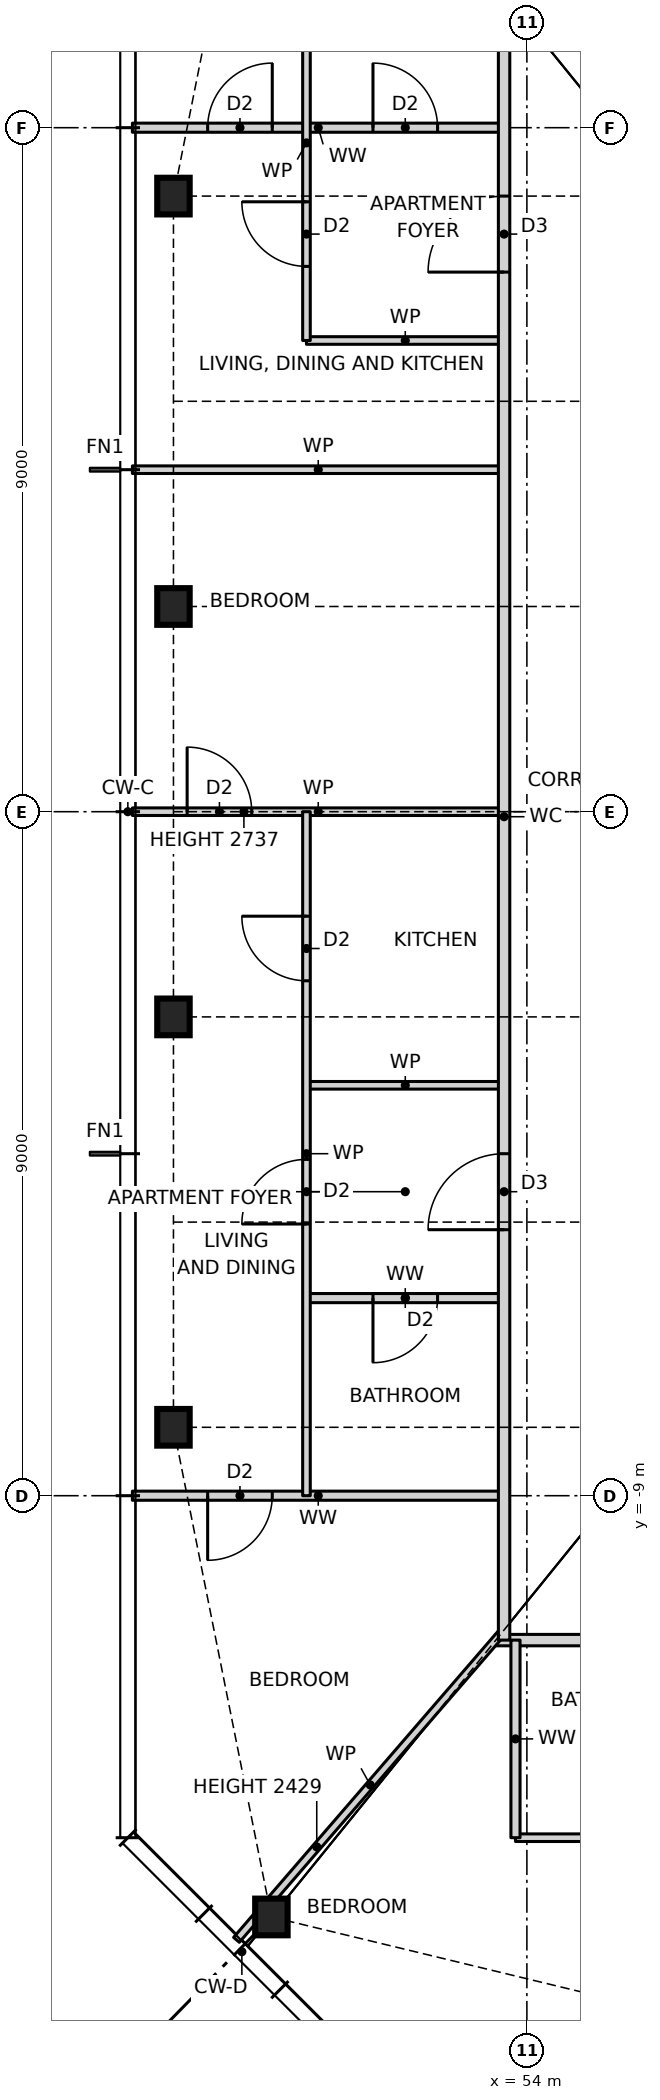
"""IFC4 building model, lengths in metres.
Left out: names, types, materials, properties, quantities, classifications, styles, units other than length and angle.
Written with IfcOpenShell. Run it as: python <this file> out.ifc"""

import sys

from ifc_helpers import new_model, si_unit, direction, frame, frame_2d, origin, origin_2d, place, context, subcontext, project, spatial, rectangle, i_section, extrude, element, fill, save


model = new_model("IFC4")
c1 = context("Model", 3, precision=1e-05, world=origin(), true_north=direction((0.0, 1.0)))
c2 = subcontext(c1, "Body", "Model", "MODEL_VIEW")
j1 = project(units=[si_unit("LENGTHUNIT", "METRE"), si_unit("PLANEANGLEUNIT", "RADIAN")], contexts=[c1])
p1 = place(None, origin())
s1 = spatial("IfcSite", under=j1, at=p1, CompositionType="ELEMENT")
p2 = place(p1, origin())
s2 = spatial("IfcBuilding", under=s1, at=p2, CompositionType="ELEMENT")
p3 = place(p2, frame((0.0, 0.0, 87.5)))
s3 = spatial("IfcBuildingStorey", under=s2, at=p3, CompositionType="ELEMENT", Elevation=87.5)
for number, where, z_axis, x_axis in (
    (1, (50.639, -14.543, 0.0), (0.0, 0.0, 1.0), (1.0, 0.0, 0.0)),
    (2, (49.35, 8.1, 0.0), (0.0, 0.0, 1.0), (1.0, 0.0, 0.0)),
    (3, (49.35, 2.7, 0.0), (0.0, 0.0, 1.0), (1.0, 0.0, 0.0)),
    (4, (49.35, -2.7, 0.0), (0.0, 0.0, 1.0), (1.0, 0.0, 0.0)),
    (5, (49.35, -8.1, 0.0), (0.0, 0.0, 1.0), (1.0, 0.0, 0.0)),
):
    element("IfcColumn", number, at=place(p3, frame(where, z_axis=z_axis, x_axis=x_axis)), inside=s3, PredefinedType="COLUMN", context=c2, shape_type="SweptSolid", body=[
        extrude(i_section(OverallWidth=0.427, OverallDepth=0.483, WebThickness=0.051, FlangeThickness=0.082, at=origin_2d()), origin(), (0.0, 0.0, 1.0), 3.5),
    ])
p4 = place(p3, frame((53.85, -13.5, 0.0), z_axis=(0.0, 0.0, 1.0), x_axis=(1.0, 0.0, 0.0)))
e6 = element("IfcWall", 6, at=p4, inside=s3, PredefinedType="PARTITIONING", context=c2, shape_type="SweptSolid", body=[
    extrude(rectangle(XDim=5.2, YDim=0.1, at=frame_2d((2.6, 0.0))), origin(), (0.0, 0.0, 1.0), 3.27),
])
p5 = place(p4, frame((3.375, 0.0, 0.0)))
e7 = element("IfcOpeningElement", 7, at=p5, cuts=e6, PredefinedType="OPENING", context=c2, shape_type="SweptSolid", body=[
    extrude(rectangle(XDim=0.85, YDim=2.1, at=frame_2d((0.425, 1.05))), frame((0.0, 0.06, 0.0), z_axis=(0.0, -1.0, 0.0), x_axis=(1.0, 0.0, 0.0)), (0.0, 0.0, 1.0), 0.12),
])
p6 = place(p3, frame((53.586, -10.9, 0.0), z_axis=(0.0, 0.0, 1.0), x_axis=(1.0, 0.0, 0.0)))
e8 = element("IfcWall", 8, at=p6, inside=s3, PredefinedType="PARTITIONING", context=c2, shape_type="SweptSolid", body=[
    extrude(rectangle(XDim=18.828, YDim=0.15, at=frame_2d((9.414, 0.0))), origin(), (0.0, 0.0, 1.0), 3.27),
])
p7 = place(p6, frame((3.564, 0.0, 0.0)))
e9 = element("IfcOpeningElement", 9, at=p7, cuts=e8, PredefinedType="OPENING", context=c2, shape_type="SweptSolid", body=[
    extrude(rectangle(XDim=1.0, YDim=2.1, at=frame_2d((0.5, 1.05))), frame((0.0, 0.085, 0.0), z_axis=(0.0, -1.0, 0.0), x_axis=(1.0, 0.0, 0.0)), (0.0, 0.0, 1.0), 0.17),
])
p8 = place(p6, frame((7.789, 0.0, 0.0)))
e10 = element("IfcOpeningElement", 10, at=p8, cuts=e8, PredefinedType="OPENING", context=c2, shape_type="SweptSolid", body=[
    extrude(rectangle(XDim=1.0, YDim=2.1, at=frame_2d((0.5, 1.05))), frame((0.0, 0.085, 0.0), z_axis=(0.0, -1.0, 0.0), x_axis=(1.0, 0.0, 0.0)), (0.0, 0.0, 1.0), 0.17),
])
p9 = place(p6, frame((12.564, 0.0, 0.0)))
e11 = element("IfcOpeningElement", 11, at=p9, cuts=e8, PredefinedType="OPENING", context=c2, shape_type="SweptSolid", body=[
    extrude(rectangle(XDim=1.0, YDim=2.1, at=frame_2d((0.5, 1.05))), frame((0.0, 0.085, 0.0), z_axis=(0.0, -1.0, 0.0), x_axis=(1.0, 0.0, 0.0)), (0.0, 0.0, 1.0), 0.17),
])
p10 = place(p3, frame((48.81, -9.0, 0.0), z_axis=(0.0, 0.0, 1.0), x_axis=(1.0, 0.0, 0.0)))
e12 = element("IfcWall", 12, at=p10, inside=s3, PredefinedType="PARTITIONING", context=c2, shape_type="SweptSolid", body=[
    extrude(rectangle(XDim=4.89, YDim=0.12, at=frame_2d((2.445, 0.0))), origin(), (0.0, 0.0, 1.0), 3.27),
])
p11 = place(p10, frame((0.99, 0.0, 0.0)))
e13 = element("IfcOpeningElement", 13, at=p11, cuts=e12, PredefinedType="OPENING", context=c2, shape_type="SweptSolid", body=[
    extrude(rectangle(XDim=0.85, YDim=2.1, at=frame_2d((0.425, 1.05))), frame((0.0, 0.07, 0.0), z_axis=(0.0, -1.0, 0.0), x_axis=(1.0, 0.0, 0.0)), (0.0, 0.0, 1.0), 0.14),
])
p12 = place(p3, frame((51.1, -6.4, 0.0), z_axis=(0.0, 0.0, 1.0), x_axis=(1.0, 0.0, 0.0)))
e14 = element("IfcWall", 14, at=p12, inside=s3, PredefinedType="PARTITIONING", context=c2, shape_type="SweptSolid", body=[
    extrude(rectangle(XDim=2.6, YDim=0.12, at=frame_2d((1.3, 0.0))), origin(), (0.0, 0.0, 1.0), 3.27),
])
p13 = place(p12, frame((0.875, 0.0, 0.0)))
e15 = element("IfcOpeningElement", 15, at=p13, cuts=e14, PredefinedType="OPENING", context=c2, shape_type="SweptSolid", body=[
    extrude(rectangle(XDim=0.85, YDim=2.1, at=frame_2d((0.425, 1.05))), frame((0.0, 0.07, 0.0), z_axis=(0.0, -1.0, 0.0), x_axis=(1.0, 0.0, 0.0)), (0.0, 0.0, 1.0), 0.14),
])
p14 = place(p3, frame((51.1, -3.6, 0.0), z_axis=(0.0, 0.0, 1.0), x_axis=(1.0, 0.0, 0.0)))
e16 = element("IfcWall", 16, at=p14, inside=s3, PredefinedType="PARTITIONING", context=c2, shape_type="SweptSolid", body=[
    extrude(rectangle(XDim=2.6, YDim=0.1, at=frame_2d((1.3, 0.0))), origin(), (0.0, 0.0, 1.0), 3.27),
])
p15 = place(p3, frame((48.81, 0.0, 0.0), z_axis=(0.0, 0.0, 1.0), x_axis=(1.0, 0.0, 0.0)))
e17 = element("IfcWall", 17, at=p15, inside=s3, PredefinedType="PARTITIONING", context=c2, shape_type="SweptSolid", body=[
    extrude(rectangle(XDim=4.89, YDim=0.1, at=frame_2d((2.445, 0.0))), origin(), (0.0, 0.0, 1.0), 2.737),
])
p16 = place(p15, frame((0.72, 0.0, 0.0)))
e18 = element("IfcOpeningElement", 18, at=p16, cuts=e17, PredefinedType="OPENING", context=c2, shape_type="SweptSolid", body=[
    extrude(rectangle(XDim=0.85, YDim=2.1, at=frame_2d((0.425, 1.05))), frame((0.0, 0.06, 0.0), z_axis=(0.0, -1.0, 0.0), x_axis=(1.0, 0.0, 0.0)), (0.0, 0.0, 1.0), 0.12),
])
p17 = place(p3, frame((48.81, 4.5, 0.0), z_axis=(0.0, 0.0, 1.0), x_axis=(1.0, 0.0, 0.0)))
e19 = element("IfcWall", 19, at=p17, inside=s3, PredefinedType="PARTITIONING", context=c2, shape_type="SweptSolid", body=[
    extrude(rectangle(XDim=4.89, YDim=0.1, at=frame_2d((2.445, 0.0))), origin(), (0.0, 0.0, 1.0), 3.27),
])
p18 = place(p3, frame((51.1, 6.2, 0.0), z_axis=(0.0, 0.0, 1.0), x_axis=(1.0, 0.0, 0.0)))
e20 = element("IfcWall", 20, at=p18, inside=s3, PredefinedType="PARTITIONING", context=c2, shape_type="SweptSolid", body=[
    extrude(rectangle(XDim=2.6, YDim=0.1, at=frame_2d((1.3, 0.0))), origin(), (0.0, 0.0, 1.0), 3.27),
])
p19 = place(p3, frame((48.81, 9.0, 0.0), z_axis=(0.0, 0.0, 1.0), x_axis=(1.0, 0.0, 0.0)))
e21 = element("IfcWall", 21, at=p19, inside=s3, PredefinedType="PARTITIONING", context=c2, shape_type="SweptSolid", body=[
    extrude(rectangle(XDim=4.89, YDim=0.12, at=frame_2d((2.445, 0.0))), origin(), (0.0, 0.0, 1.0), 3.27),
])
p20 = place(p19, frame((3.165, 0.0, 0.0)))
e22 = element("IfcOpeningElement", 22, at=p20, cuts=e21, PredefinedType="OPENING", context=c2, shape_type="SweptSolid", body=[
    extrude(rectangle(XDim=0.85, YDim=2.1, at=frame_2d((0.425, 1.05))), frame((0.0, 0.07, 0.0), z_axis=(0.0, -1.0, 0.0), x_axis=(1.0, 0.0, 0.0)), (0.0, 0.0, 1.0), 0.14),
])
p21 = place(p19, frame((0.99, 0.0, 0.0)))
e23 = element("IfcOpeningElement", 23, at=p21, cuts=e21, PredefinedType="OPENING", context=c2, shape_type="SweptSolid", body=[
    extrude(rectangle(XDim=0.85, YDim=2.1, at=frame_2d((0.425, 1.05))), frame((0.0, 0.07, 0.0), z_axis=(0.0, -1.0, 0.0), x_axis=(1.0, 0.0, 0.0)), (0.0, 0.0, 1.0), 0.14),
])
p22 = place(p3, frame((50.179, -14.844, 0.0), z_axis=(0.0, 0.0, 1.0), x_axis=(0.653713095188, 0.756742485381, 0.0)))
e24 = element("IfcWall", 24, at=p22, inside=s3, PredefinedType="PARTITIONING", context=c2, shape_type="SweptSolid", body=[
    extrude(rectangle(XDim=5.386, YDim=0.1, at=frame_2d((2.693, 0.0))), origin(), (0.0, 0.0, 1.0), 2.429),
])
p23 = place(p3, frame((53.85, -13.5, 0.0), z_axis=(0.0, 0.0, 1.0), x_axis=(0.0, 1.0, 0.0)))
e25 = element("IfcWall", 25, at=p23, inside=s3, PredefinedType="PARTITIONING", context=c2, shape_type="SweptSolid", body=[
    extrude(rectangle(XDim=2.6, YDim=0.12, at=frame_2d((1.3, 0.0))), origin(), (0.0, 0.0, 1.0), 3.27),
])
p24 = place(p3, frame((53.7, -10.9, 0.0), z_axis=(0.0, 0.0, 1.0), x_axis=(0.0, 1.0, 0.0)))
e26 = element("IfcWall", 26, at=p24, inside=s3, PredefinedType="PARTITIONING", context=c2, shape_type="SweptSolid", body=[
    extrude(rectangle(XDim=21.668, YDim=0.15, at=frame_2d((10.834, 0.0))), origin(), (0.0, 0.0, 1.0), 3.27),
])
p25 = place(p24, frame((18.0, 0.0, 0.0)))
e27 = element("IfcOpeningElement", 27, at=p25, cuts=e26, PredefinedType="OPENING", context=c2, shape_type="SweptSolid", body=[
    extrude(rectangle(XDim=1.0, YDim=2.1, at=frame_2d((0.5, 1.05))), frame((0.0, 0.085, 0.0), z_axis=(0.0, -1.0, 0.0), x_axis=(1.0, 0.0, 0.0)), (0.0, 0.0, 1.0), 0.17),
])
p26 = place(p24, frame((5.4, 0.0, 0.0)))
e28 = element("IfcOpeningElement", 28, at=p26, cuts=e26, PredefinedType="OPENING", context=c2, shape_type="SweptSolid", body=[
    extrude(rectangle(XDim=1.0, YDim=2.1, at=frame_2d((0.5, 1.05))), frame((0.0, 0.085, 0.0), z_axis=(0.0, -1.0, 0.0), x_axis=(1.0, 0.0, 0.0)), (0.0, 0.0, 1.0), 0.17),
])
p27 = place(p3, frame((51.1, -9.0, 0.0), z_axis=(0.0, 0.0, 1.0), x_axis=(0.0, 1.0, 0.0)))
e29 = element("IfcWall", 29, at=p27, inside=s3, PredefinedType="PARTITIONING", context=c2, shape_type="SweptSolid", body=[
    extrude(rectangle(XDim=9.0, YDim=0.1, at=frame_2d((4.5, 0.0))), origin(), (0.0, 0.0, 1.0), 3.27),
])
p28 = place(p27, frame((6.775, 0.0, 0.0)))
e30 = element("IfcOpeningElement", 30, at=p28, cuts=e29, PredefinedType="OPENING", context=c2, shape_type="SweptSolid", body=[
    extrude(rectangle(XDim=0.85, YDim=2.1, at=frame_2d((0.425, 1.05))), frame((0.0, 0.06, 0.0), z_axis=(0.0, -1.0, 0.0), x_axis=(1.0, 0.0, 0.0)), (0.0, 0.0, 1.0), 0.12),
])
p29 = place(p27, frame((3.575, 0.0, 0.0)))
e31 = element("IfcOpeningElement", 31, at=p29, cuts=e29, PredefinedType="OPENING", context=c2, shape_type="SweptSolid", body=[
    extrude(rectangle(XDim=0.85, YDim=2.1, at=frame_2d((0.425, 1.05))), frame((0.0, 0.06, 0.0), z_axis=(0.0, -1.0, 0.0), x_axis=(1.0, 0.0, 0.0)), (0.0, 0.0, 1.0), 0.12),
])
p30 = place(p3, frame((51.1, 6.2, 0.0), z_axis=(0.0, 0.0, 1.0), x_axis=(0.0, 1.0, 0.0)))
e32 = element("IfcWall", 32, at=p30, inside=s3, PredefinedType="PARTITIONING", context=c2, shape_type="SweptSolid", body=[
    extrude(rectangle(XDim=5.2, YDim=0.1, at=frame_2d((2.6, 0.0))), origin(), (0.0, 0.0, 1.0), 3.27),
])
p31 = place(p30, frame((0.975, 0.0, 0.0)))
e33 = element("IfcOpeningElement", 33, at=p31, cuts=e32, PredefinedType="OPENING", context=c2, shape_type="SweptSolid", body=[
    extrude(rectangle(XDim=0.85, YDim=2.1, at=frame_2d((0.425, 1.05))), frame((0.0, 0.06, 0.0), z_axis=(0.0, -1.0, 0.0), x_axis=(1.0, 0.0, 0.0)), (0.0, 0.0, 1.0), 0.12),
])
p32 = place(p25, origin())
e34 = element("IfcDoor", 34, at=p32, inside=s3, OperationType="SINGLE_SWING_LEFT", PredefinedType="DOOR", context=c2, shape_type="SweptSolid", body=[
    extrude(rectangle(XDim=1.0, YDim=2.1, at=frame_2d((0.5, 1.05))), frame((0.0, 0.025, 0.0), z_axis=(0.0, -1.0, 0.0), x_axis=(1.0, 0.0, 0.0)), (0.0, 0.0, 1.0), 0.05),
])
fill(e27, e34)
p33 = place(p31, origin())
e35 = element("IfcDoor", 35, at=p33, inside=s3, OperationType="SINGLE_SWING_RIGHT", PredefinedType="DOOR", context=c2, shape_type="SweptSolid", body=[
    extrude(rectangle(XDim=0.85, YDim=2.1, at=frame_2d((0.425, 1.05))), frame((0.0, 0.025, 0.0), z_axis=(0.0, -1.0, 0.0), x_axis=(1.0, 0.0, 0.0)), (0.0, 0.0, 1.0), 0.05),
])
fill(e33, e35)
p34 = place(p20, origin())
e36 = element("IfcDoor", 36, at=p34, inside=s3, OperationType="SINGLE_SWING_LEFT", PredefinedType="DOOR", context=c2, shape_type="SweptSolid", body=[
    extrude(rectangle(XDim=0.85, YDim=2.1, at=frame_2d((0.425, 1.05))), frame((0.0, 0.025, 0.0), z_axis=(0.0, -1.0, 0.0), x_axis=(1.0, 0.0, 0.0)), (0.0, 0.0, 1.0), 0.05),
])
fill(e22, e36)
p35 = place(p21, origin())
e37 = element("IfcDoor", 37, at=p35, inside=s3, OperationType="SINGLE_SWING_RIGHT", PredefinedType="DOOR", context=c2, shape_type="SweptSolid", body=[
    extrude(rectangle(XDim=0.85, YDim=2.1, at=frame_2d((0.425, 1.05))), frame((0.0, 0.025, 0.0), z_axis=(0.0, -1.0, 0.0), x_axis=(1.0, 0.0, 0.0)), (0.0, 0.0, 1.0), 0.05),
])
fill(e23, e37)
p36 = place(p28, origin())
e38 = element("IfcDoor", 38, at=p36, inside=s3, OperationType="SINGLE_SWING_RIGHT", PredefinedType="DOOR", context=c2, shape_type="SweptSolid", body=[
    extrude(rectangle(XDim=0.85, YDim=2.1, at=frame_2d((0.425, 1.05))), frame((0.0, 0.025, 0.0), z_axis=(0.0, -1.0, 0.0), x_axis=(1.0, 0.0, 0.0)), (0.0, 0.0, 1.0), 0.05),
])
fill(e30, e38)
p37 = place(p26, origin())
e39 = element("IfcDoor", 39, at=p37, inside=s3, OperationType="SINGLE_SWING_LEFT", PredefinedType="DOOR", context=c2, shape_type="SweptSolid", body=[
    extrude(rectangle(XDim=1.0, YDim=2.1, at=frame_2d((0.5, 1.05))), frame((0.0, 0.025, 0.0), z_axis=(0.0, -1.0, 0.0), x_axis=(1.0, 0.0, 0.0)), (0.0, 0.0, 1.0), 0.05),
])
fill(e28, e39)
p38 = place(p29, origin())
e40 = element("IfcDoor", 40, at=p38, inside=s3, OperationType="SINGLE_SWING_LEFT", PredefinedType="DOOR", context=c2, shape_type="SweptSolid", body=[
    extrude(rectangle(XDim=0.85, YDim=2.1, at=frame_2d((0.425, 1.05))), frame((0.0, 0.025, 0.0), z_axis=(0.0, -1.0, 0.0), x_axis=(1.0, 0.0, 0.0)), (0.0, 0.0, 1.0), 0.05),
])
fill(e31, e40)
p39 = place(p13, frame((0.85, 0.0, 0.0), z_axis=(0.0, 0.0, 1.0), x_axis=(-1.0, 0.0, 0.0)))
e41 = element("IfcDoor", 41, at=p39, inside=s3, OperationType="SINGLE_SWING_RIGHT", PredefinedType="DOOR", context=c2, shape_type="SweptSolid", body=[
    extrude(rectangle(XDim=0.85, YDim=2.1, at=frame_2d((0.425, 1.05))), frame((0.0, 0.025, 0.0), z_axis=(0.0, -1.0, 0.0), x_axis=(1.0, 0.0, 0.0)), (0.0, 0.0, 1.0), 0.05),
])
fill(e15, e41)
p40 = place(p16, origin())
e42 = element("IfcDoor", 42, at=p40, inside=s3, OperationType="SINGLE_SWING_LEFT", PredefinedType="DOOR", context=c2, shape_type="SweptSolid", body=[
    extrude(rectangle(XDim=0.85, YDim=2.1, at=frame_2d((0.425, 1.05))), frame((0.0, 0.025, 0.0), z_axis=(0.0, -1.0, 0.0), x_axis=(1.0, 0.0, 0.0)), (0.0, 0.0, 1.0), 0.05),
])
fill(e18, e42)
p41 = place(p11, frame((0.85, 0.0, 0.0), z_axis=(0.0, 0.0, 1.0), x_axis=(-1.0, 0.0, 0.0)))
e43 = element("IfcDoor", 43, at=p41, inside=s3, OperationType="SINGLE_SWING_RIGHT", PredefinedType="DOOR", context=c2, shape_type="SweptSolid", body=[
    extrude(rectangle(XDim=0.85, YDim=2.1, at=frame_2d((0.425, 1.05))), frame((0.0, 0.025, 0.0), z_axis=(0.0, -1.0, 0.0), x_axis=(1.0, 0.0, 0.0)), (0.0, 0.0, 1.0), 0.05),
])
fill(e13, e43)
save(model, sys.argv[1])
